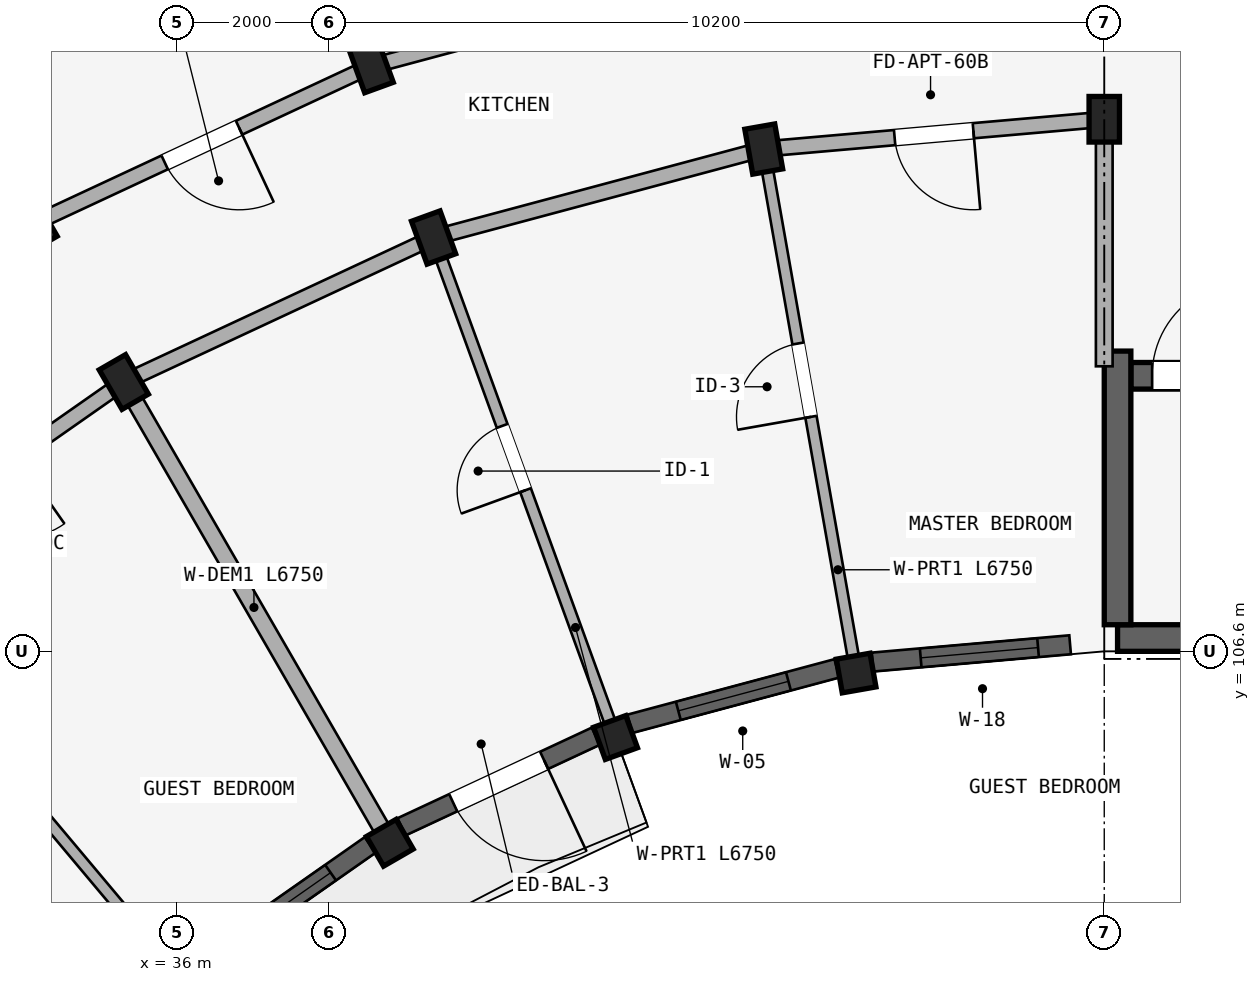
"""IFC4 building model, lengths in metres.
Left out: names, types, materials, properties, quantities, classifications, styles, units other than length and angle.
Written with IfcOpenShell. Run it as: python <this file> out.ifc"""

import sys

from ifc_helpers import new_model, si_unit, direction, frame, frame_2d, origin, origin_2d, place, context, subcontext, project, spatial, rectangle, extrude, element, fill, save


model = new_model("IFC4")
c1 = context("Model", 3, precision=1e-05, world=origin(), true_north=direction((0.0, 1.0)))
c2 = subcontext(c1, "Body", "Model", "MODEL_VIEW")
j1 = project(units=[si_unit("LENGTHUNIT", "METRE"), si_unit("PLANEANGLEUNIT", "RADIAN")], contexts=[c1])
p1 = place(None, origin())
s1 = spatial("IfcSite", under=j1, at=p1, CompositionType="ELEMENT")
p2 = place(p1, origin())
s2 = spatial("IfcBuilding", under=s1, at=p2, CompositionType="ELEMENT")
p3 = place(p2, frame((0.0, 0.0, 49.65)))
s3 = spatial("IfcBuildingStorey", under=s2, at=p3, CompositionType="ELEMENT", Elevation=49.65)
p4 = place(p3, frame((48.375, 106.775, 0.0), z_axis=(0.0, 0.0, 1.0), x_axis=(1.0, 0.0, 0.0)))
e1 = element("IfcWall", 1, at=p4, inside=s3, PredefinedType="SHEAR", context=c2, shape_type="SweptSolid", body=[
    extrude(rectangle(XDim=8.25, YDim=0.35, at=frame_2d((4.125, 0.0))), origin(), (0.0, 0.0, 1.0), 2.91),
])
p5 = place(p3, frame((48.55, 110.225, 0.0), z_axis=(0.0, 0.0, 1.0), x_axis=(1.0, 0.0, 0.0)))
e2 = element("IfcWall", 2, at=p5, inside=s3, PredefinedType="SHEAR", context=c2, shape_type="SweptSolid", body=[
    extrude(rectangle(XDim=7.9, YDim=0.35, at=frame_2d((3.95, 0.0))), origin(), (0.0, 0.0, 1.0), 2.91),
])
p6 = place(p5, frame((0.28, 0.0, 0.0)))
e3 = element("IfcOpeningElement", 3, at=p6, cuts=e2, PredefinedType="OPENING", context=c2, shape_type="SweptSolid", body=[
    extrude(rectangle(XDim=1.24, YDim=2.15, at=frame_2d((0.62, 1.075))), frame((0.0, 0.185, 0.0), z_axis=(0.0, -1.0, 0.0), x_axis=(1.0, 0.0, 0.0)), (0.0, 0.0, 1.0), 0.37),
])
p7 = place(p3, frame((48.375, 106.95, 0.0), z_axis=(0.0, 0.0, 1.0), x_axis=(0.0, 1.0, 0.0)))
e4 = element("IfcWall", 4, at=p7, inside=s3, PredefinedType="SHEAR", context=c2, shape_type="SweptSolid", body=[
    extrude(rectangle(XDim=3.6, YDim=0.35, at=frame_2d((1.8, 0.0))), origin(), (0.0, 0.0, 1.0), 2.91),
])
p8 = place(p3, frame((48.2, 113.6, 0.0), z_axis=(0.0, 0.0, 1.0), x_axis=(1.0, 0.0, 0.0)))
e5 = element("IfcColumn", 5, at=p8, inside=s3, PredefinedType="COLUMN", context=c2, shape_type="SweptSolid", body=[
    extrude(rectangle(XDim=0.4, YDim=0.6, at=origin_2d()), origin(), (0.0, 0.0, 1.0), 2.91),
])
p9 = place(p3, frame((44.935, 106.314, 0.0), z_axis=(0.0, 0.0, 1.0), x_axis=(0.984807753012, 0.173648177667, 0.0)))
e6 = element("IfcColumn", 6, at=p9, inside=s3, PredefinedType="COLUMN", context=c2, shape_type="SweptSolid", body=[
    extrude(rectangle(XDim=0.45, YDim=0.45, at=origin_2d()), origin(), (0.0, 0.0, 1.0), 2.91),
])
p10 = place(p3, frame((43.72, 113.208, 0.0), z_axis=(0.0, 0.0, 1.0), x_axis=(0.984807753012, 0.173648177667, 0.0)))
e7 = element("IfcColumn", 7, at=p10, inside=s3, PredefinedType="COLUMN", context=c2, shape_type="SweptSolid", body=[
    extrude(rectangle(XDim=0.4, YDim=0.6, at=origin_2d()), origin(), (0.0, 0.0, 1.0), 2.91),
])
p11 = place(p3, frame((41.77, 105.466, 0.0), z_axis=(0.0, 0.0, 1.0), x_axis=(0.939692620786, 0.342020143326, 0.0)))
e8 = element("IfcColumn", 8, at=p11, inside=s3, PredefinedType="COLUMN", context=c2, shape_type="SweptSolid", body=[
    extrude(rectangle(XDim=0.45, YDim=0.45, at=origin_2d()), origin(), (0.0, 0.0, 1.0), 2.91),
])
for number, where, z_axis, x_axis in (
    (9, (39.376, 112.044, 0.0), (0.0, 0.0, 1.0), (0.94, 0.342, 0.0)),
    (10, (38.555, 114.299, 0.0), (0.0, 0.0, 1.0), (0.94, 0.342, 0.0)),
):
    element("IfcColumn", number, at=place(p3, frame(where, z_axis=z_axis, x_axis=x_axis)), inside=s3, PredefinedType="COLUMN", context=c2, shape_type="SweptSolid", body=[
        extrude(rectangle(XDim=0.4, YDim=0.6, at=origin_2d()), origin(), (0.0, 0.0, 1.0), 2.91),
    ])
p12 = place(p3, frame((38.8, 104.081, 0.0), z_axis=(0.0, 0.0, 1.0), x_axis=(0.866025403784, 0.5, 0.0)))
e11 = element("IfcColumn", 11, at=p12, inside=s3, PredefinedType="COLUMN", context=c2, shape_type="SweptSolid", body=[
    extrude(rectangle(XDim=0.45, YDim=0.45, at=origin_2d()), origin(), (0.0, 0.0, 1.0), 2.91),
])
for number, where, z_axis, x_axis in (
    (12, (35.3, 110.144, 0.0), (0.0, 0.0, 1.0), (0.866, 0.5, 0.0)),
    (13, (34.1, 112.222, 0.0), (0.0, 0.0, 1.0), (0.866, 0.5, 0.0)),
):
    element("IfcColumn", number, at=place(p3, frame(where, z_axis=z_axis, x_axis=x_axis)), inside=s3, PredefinedType="COLUMN", context=c2, shape_type="SweptSolid", body=[
        extrude(rectangle(XDim=0.4, YDim=0.6, at=origin_2d()), origin(), (0.0, 0.0, 1.0), 2.91),
    ])
p13 = place(p3, frame((48.2, 113.6, 0.0), z_axis=(0.0, 0.0, 1.0), x_axis=(-0.996191949488, -0.087187153726, 0.0)))
e14 = element("IfcWall", 14, at=p13, inside=s3, PredefinedType="STANDARD", context=c2, shape_type="SweptSolid", body=[
    extrude(rectangle(XDim=4.497, YDim=0.2, at=frame_2d((2.249, 0.0))), origin(), (0.0, 0.0, 1.0), 2.352),
])
p14 = place(p13, frame((1.729, 0.0, 0.0)))
e15 = element("IfcOpeningElement", 15, at=p14, cuts=e14, PredefinedType="OPENING", context=c2, shape_type="SweptSolid", body=[
    extrude(rectangle(XDim=1.04, YDim=2.15, at=frame_2d((0.52, 1.075))), frame((0.0, 0.11, 0.0), z_axis=(0.0, -1.0, 0.0), x_axis=(1.0, 0.0, 0.0)), (0.0, 0.0, 1.0), 0.22),
])
p15 = place(p3, frame((43.72, 113.208, 0.0), z_axis=(0.0, 0.0, 1.0), x_axis=(-0.965934240054, -0.258787642463, 0.0)))
e16 = element("IfcWall", 16, at=p15, inside=s3, PredefinedType="STANDARD", context=c2, shape_type="SweptSolid", body=[
    extrude(rectangle(XDim=4.497, YDim=0.2, at=frame_2d((2.249, 0.0))), origin(), (0.0, 0.0, 1.0), 2.352),
])
p16 = place(p3, frame((43.303, 115.572, 0.0), z_axis=(0.0, 0.0, 1.0), x_axis=(-0.965930095386, -0.258803112091, 0.0)))
e17 = element("IfcWall", 17, at=p16, inside=s3, PredefinedType="STANDARD", context=c2, shape_type="SweptSolid", body=[
    extrude(rectangle(XDim=4.916, YDim=0.2, at=frame_2d((2.458, 0.0))), origin(), (0.0, 0.0, 1.0), 2.352),
])
p17 = place(p3, frame((39.376, 112.044, 0.0), z_axis=(0.0, 0.0, 1.0), x_axis=(-0.906307919131, -0.422617978463, 0.0)))
e18 = element("IfcWall", 18, at=p17, inside=s3, PredefinedType="STANDARD", context=c2, shape_type="SweptSolid", body=[
    extrude(rectangle(XDim=4.497, YDim=0.2, at=frame_2d((2.249, 0.0))), origin(), (0.0, 0.0, 1.0), 2.352),
])
p18 = place(p3, frame((38.555, 114.299, 0.0), z_axis=(0.0, 0.0, 1.0), x_axis=(-0.906302381024, -0.422629854778, 0.0)))
e19 = element("IfcWall", 19, at=p18, inside=s3, PredefinedType="STANDARD", context=c2, shape_type="SweptSolid", body=[
    extrude(rectangle(XDim=4.915, YDim=0.2, at=frame_2d((2.458, 0.0))), origin(), (0.0, 0.0, 1.0), 2.352),
])
p19 = place(p18, frame((1.918, 0.0, 0.0)))
e20 = element("IfcOpeningElement", 20, at=p19, cuts=e19, PredefinedType="OPENING", context=c2, shape_type="SweptSolid", body=[
    extrude(rectangle(XDim=1.08, YDim=2.15, at=frame_2d((0.54, 1.075))), frame((0.0, 0.11, 0.0), z_axis=(0.0, -1.0, 0.0), x_axis=(1.0, 0.0, 0.0)), (0.0, 0.0, 1.0), 0.22),
])
p20 = place(p3, frame((35.3, 110.144, 0.0), z_axis=(0.0, 0.0, 1.0), x_axis=(-0.819155404658, -0.573571637217, 0.0)))
e21 = element("IfcWall", 21, at=p20, inside=s3, PredefinedType="STANDARD", context=c2, shape_type="SweptSolid", body=[
    extrude(rectangle(XDim=4.497, YDim=0.2, at=frame_2d((2.249, 0.0))), origin(), (0.0, 0.0, 1.0), 2.352),
])
p21 = place(p20, frame((1.709, 0.0, 0.0)))
e22 = element("IfcOpeningElement", 22, at=p21, cuts=e21, PredefinedType="OPENING", context=c2, shape_type="SweptSolid", body=[
    extrude(rectangle(XDim=1.08, YDim=2.15, at=frame_2d((0.54, 1.075))), frame((0.0, 0.11, 0.0), z_axis=(0.0, -1.0, 0.0), x_axis=(1.0, 0.0, 0.0)), (0.0, 0.0, 1.0), 0.22),
])
p22 = place(p3, frame((48.2, 110.35, 0.0), z_axis=(0.0, 0.0, 1.0), x_axis=(0.0, 1.0, 0.0)))
e23 = element("IfcWall", 23, at=p22, inside=s3, PredefinedType="STANDARD", context=c2, shape_type="SweptSolid", body=[
    extrude(rectangle(XDim=3.2, YDim=0.22, at=frame_2d((1.6, 0.0))), origin(), (0.0, 0.0, 1.0), 2.352),
])
p23 = place(p3, frame((44.901, 106.511, 0.0), z_axis=(0.0, 0.0, 1.0), x_axis=(-0.173647089161, 0.984807944945, 0.0)))
e24 = element("IfcWall", 24, at=p23, inside=s3, PredefinedType="PARTITIONING", context=c2, shape_type="SweptSolid", body=[
    extrude(rectangle(XDim=6.75, YDim=0.15, at=frame_2d((3.375, 0.0))), origin(), (0.0, 0.0, 1.0), 2.352),
])
p24 = place(p23, frame((3.222, 0.0, 0.0)))
e25 = element("IfcOpeningElement", 25, at=p24, cuts=e24, PredefinedType="OPENING", context=c2, shape_type="SweptSolid", body=[
    extrude(rectangle(XDim=0.98, YDim=2.12, at=frame_2d((0.49, 1.06))), frame((0.0, 0.085, 0.0), z_axis=(0.0, -1.0, 0.0), x_axis=(1.0, 0.0, 0.0)), (0.0, 0.0, 1.0), 0.17),
])
p25 = place(p3, frame((41.702, 105.654, 0.0), z_axis=(0.0, 0.0, 1.0), x_axis=(-0.342010221662, 0.939696231917, 0.0)))
e26 = element("IfcWall", 26, at=p25, inside=s3, PredefinedType="PARTITIONING", context=c2, shape_type="SweptSolid", body=[
    extrude(rectangle(XDim=6.75, YDim=0.15, at=frame_2d((3.375, 0.0))), origin(), (0.0, 0.0, 1.0), 2.352),
])
p26 = place(p25, frame((3.262, 0.0, 0.0)))
e27 = element("IfcOpeningElement", 27, at=p26, cuts=e26, PredefinedType="OPENING", context=c2, shape_type="SweptSolid", body=[
    extrude(rectangle(XDim=0.9, YDim=2.1, at=frame_2d((0.45, 1.05))), frame((0.0, 0.085, 0.0), z_axis=(0.0, -1.0, 0.0), x_axis=(1.0, 0.0, 0.0)), (0.0, 0.0, 1.0), 0.17),
])
p27 = place(p3, frame((38.521, 114.393, 0.0), z_axis=(0.0, 0.0, 1.0), x_axis=(-0.341992021352, 0.939702855871, 0.0)))
e28 = element("IfcWall", 28, at=p27, inside=s3, PredefinedType="STANDARD", context=c2, shape_type="SweptSolid", body=[
    extrude(rectangle(XDim=6.22, YDim=0.22, at=frame_2d((3.11, 0.0))), origin(), (0.0, 0.0, 1.0), 2.352),
])
p28 = place(p3, frame((38.7, 104.254, 0.0), z_axis=(0.0, 0.0, 1.0), x_axis=(-0.499997969693, 0.866026575979, 0.0)))
e29 = element("IfcWall", 29, at=p28, inside=s3, PredefinedType="STANDARD", context=c2, shape_type="SweptSolid", body=[
    extrude(rectangle(XDim=6.75, YDim=0.22, at=frame_2d((3.375, 0.0))), origin(), (0.0, 0.0, 1.0), 2.352),
])
p29 = place(p3, frame((35.987, 102.355, 0.0), z_axis=(0.0, 0.0, 1.0), x_axis=(-0.642784846501, 0.766046761698, 0.0)))
e30 = element("IfcWall", 30, at=p29, inside=s3, PredefinedType="PARTITIONING", context=c2, shape_type="SweptSolid", body=[
    extrude(rectangle(XDim=6.75, YDim=0.15, at=frame_2d((3.375, 0.0))), origin(), (0.0, 0.0, 1.0), 2.352),
])
p30 = place(p29, frame((3.222, 0.0, 0.0)))
e31 = element("IfcOpeningElement", 31, at=p30, cuts=e30, PredefinedType="OPENING", context=c2, shape_type="SweptSolid", body=[
    extrude(rectangle(XDim=0.98, YDim=2.12, at=frame_2d((0.49, 1.06))), frame((0.0, 0.085, 0.0), z_axis=(0.0, -1.0, 0.0), x_axis=(1.0, 0.0, 0.0)), (0.0, 0.0, 1.0), 0.17),
])
p31 = place(p3, frame((47.751, 106.686, 0.0), z_axis=(0.0, 0.0, 1.0), x_axis=(-0.996188433092, -0.087227322402, 0.0)))
e32 = element("IfcWall", 32, at=p31, inside=s3, PredefinedType="STANDARD", context=c2, shape_type="SweptSolid", body=[
    extrude(rectangle(XDim=2.609, YDim=0.25, at=frame_2d((1.304, 0.0))), origin(), (0.0, 0.0, 1.0), 2.402),
])
p32 = place(p31, frame((0.424, 0.0, 0.602)))
e33 = element("IfcOpeningElement", 33, at=p32, cuts=e32, PredefinedType="OPENING", context=c2, shape_type="SweptSolid", body=[
    extrude(rectangle(XDim=1.55, YDim=1.6, at=frame_2d((0.775, 0.8))), frame((0.0, 0.135, 0.0), z_axis=(0.0, -1.0, 0.0), x_axis=(1.0, 0.0, 0.0)), (0.0, 0.0, 1.0), 0.27),
])
p33 = place(p3, frame((44.682, 106.376, 0.0), z_axis=(0.0, 0.0, 1.0), x_axis=(-0.965921001908, -0.258837049266, 0.0)))
e34 = element("IfcWall", 34, at=p33, inside=s3, PredefinedType="STANDARD", context=c2, shape_type="SweptSolid", body=[
    extrude(rectangle(XDim=2.82, YDim=0.25, at=frame_2d((1.41, 0.0))), origin(), (0.0, 0.0, 1.0), 2.402),
])
p34 = place(p33, frame((0.66, 0.0, 0.552)))
e35 = element("IfcOpeningElement", 35, at=p34, cuts=e34, PredefinedType="OPENING", context=c2, shape_type="SweptSolid", body=[
    extrude(rectangle(XDim=1.5, YDim=1.65, at=frame_2d((0.75, 0.825))), frame((0.0, 0.135, 0.0), z_axis=(0.0, -1.0, 0.0), x_axis=(1.0, 0.0, 0.0)), (0.0, 0.0, 1.0), 0.27),
])
p35 = place(p3, frame((41.51, 105.483, 0.0), z_axis=(0.0, 0.0, 1.0), x_axis=(-0.906284857185, -0.422667431484, 0.0)))
e36 = element("IfcWall", 36, at=p35, inside=s3, PredefinedType="STANDARD", context=c2, shape_type="SweptSolid", body=[
    extrude(rectangle(XDim=2.82, YDim=0.25, at=frame_2d((1.41, 0.0))), origin(), (0.0, 0.0, 1.0), 2.402),
])
p36 = place(p35, frame((0.75, 0.0, 0.0)))
e37 = element("IfcOpeningElement", 37, at=p36, cuts=e36, PredefinedType="OPENING", context=c2, shape_type="SweptSolid", body=[
    extrude(rectangle(XDim=1.32, YDim=2.15, at=frame_2d((0.66, 1.075))), frame((0.0, 0.135, 0.0), z_axis=(0.0, -1.0, 0.0), x_axis=(1.0, 0.0, 0.0)), (0.0, 0.0, 1.0), 0.27),
])
p37 = place(p3, frame((38.541, 104.053, 0.0), z_axis=(0.0, 0.0, 1.0), x_axis=(-0.819154644592, -0.573572722716, 0.0)))
e38 = element("IfcWall", 38, at=p37, inside=s3, PredefinedType="STANDARD", context=c2, shape_type="SweptSolid", body=[
    extrude(rectangle(XDim=2.82, YDim=0.25, at=frame_2d((1.41, 0.0))), origin(), (0.0, 0.0, 1.0), 2.402),
])
p38 = place(p37, frame((0.635, 0.0, 0.602)))
e39 = element("IfcOpeningElement", 39, at=p38, cuts=e38, PredefinedType="OPENING", context=c2, shape_type="SweptSolid", body=[
    extrude(rectangle(XDim=1.55, YDim=1.6, at=frame_2d((0.775, 0.8))), frame((0.0, 0.135, 0.0), z_axis=(0.0, -1.0, 0.0), x_axis=(1.0, 0.0, 0.0)), (0.0, 0.0, 1.0), 0.27),
])
p39 = place(p32, origin())
e40 = element("IfcWindow", 40, at=p39, inside=s3, PartitioningType="DOUBLE_PANEL_VERTICAL", PredefinedType="WINDOW", context=c2, shape_type="SweptSolid", body=[
    extrude(rectangle(XDim=1.55, YDim=1.6, at=frame_2d((0.775, 0.8))), frame((0.0, 0.03, 0.0), z_axis=(0.0, -1.0, 0.0), x_axis=(1.0, 0.0, 0.0)), (0.0, 0.0, 1.0), 0.06),
])
fill(e33, e40)
p40 = place(p34, origin())
e41 = element("IfcWindow", 41, at=p40, inside=s3, PartitioningType="DOUBLE_PANEL_VERTICAL", PredefinedType="WINDOW", context=c2, shape_type="SweptSolid", body=[
    extrude(rectangle(XDim=1.5, YDim=1.65, at=frame_2d((0.75, 0.825))), frame((0.0, 0.03, 0.0), z_axis=(0.0, -1.0, 0.0), x_axis=(1.0, 0.0, 0.0)), (0.0, 0.0, 1.0), 0.06),
])
fill(e35, e41)
p41 = place(p38, origin())
e42 = element("IfcWindow", 42, at=p41, inside=s3, PartitioningType="DOUBLE_PANEL_VERTICAL", PredefinedType="WINDOW", context=c2, shape_type="SweptSolid", body=[
    extrude(rectangle(XDim=1.55, YDim=1.6, at=frame_2d((0.775, 0.8))), frame((0.0, 0.03, 0.0), z_axis=(0.0, -1.0, 0.0), x_axis=(1.0, 0.0, 0.0)), (0.0, 0.0, 1.0), 0.06),
])
fill(e39, e42)
p42 = place(p6, frame((1.24, 0.0, 0.0), z_axis=(0.0, 0.0, 1.0), x_axis=(-1.0, 0.0, 0.0)))
e43 = element("IfcDoor", 43, at=p42, inside=s3, OperationType="SINGLE_SWING_LEFT", PredefinedType="DOOR", context=c2, shape_type="SweptSolid", body=[
    extrude(rectangle(XDim=1.24, YDim=2.15, at=frame_2d((0.62, 1.075))), frame((0.0, 0.025, 0.0), z_axis=(0.0, -1.0, 0.0), x_axis=(1.0, 0.0, 0.0)), (0.0, 0.0, 1.0), 0.05),
])
fill(e3, e43)
p43 = place(p24, frame((0.98, 0.0, 0.0), z_axis=(0.0, 0.0, 1.0), x_axis=(-1.0, 0.0, 0.0)))
e44 = element("IfcDoor", 44, at=p43, inside=s3, OperationType="SINGLE_SWING_RIGHT", PredefinedType="DOOR", context=c2, shape_type="SweptSolid", body=[
    extrude(rectangle(XDim=0.98, YDim=2.12, at=frame_2d((0.49, 1.06))), frame((0.0, 0.025, 0.0), z_axis=(0.0, -1.0, 0.0), x_axis=(1.0, 0.0, 0.0)), (0.0, 0.0, 1.0), 0.05),
])
fill(e25, e44)
p44 = place(p26, frame((0.9, 0.0, 0.0), z_axis=(0.0, 0.0, 1.0), x_axis=(-1.0, 0.0, 0.0)))
e45 = element("IfcDoor", 45, at=p44, inside=s3, OperationType="SINGLE_SWING_RIGHT", PredefinedType="DOOR", context=c2, shape_type="SweptSolid", body=[
    extrude(rectangle(XDim=0.9, YDim=2.1, at=frame_2d((0.45, 1.05))), frame((0.0, 0.025, 0.0), z_axis=(0.0, -1.0, 0.0), x_axis=(1.0, 0.0, 0.0)), (0.0, 0.0, 1.0), 0.05),
])
fill(e27, e45)
p45 = place(p19, frame((1.08, 0.0, 0.0), z_axis=(0.0, 0.0, 1.0), x_axis=(-1.0, 0.0, 0.0)))
e46 = element("IfcDoor", 46, at=p45, inside=s3, OperationType="SINGLE_SWING_RIGHT", PredefinedType="DOOR", context=c2, shape_type="SweptSolid", body=[
    extrude(rectangle(XDim=1.08, YDim=2.15, at=frame_2d((0.54, 1.075))), frame((0.0, 0.025, 0.0), z_axis=(0.0, -1.0, 0.0), x_axis=(1.0, 0.0, 0.0)), (0.0, 0.0, 1.0), 0.05),
])
fill(e20, e46)
p46 = place(p14, origin())
e47 = element("IfcDoor", 47, at=p46, inside=s3, OperationType="SINGLE_SWING_LEFT", PredefinedType="DOOR", context=c2, shape_type="SweptSolid", body=[
    extrude(rectangle(XDim=1.04, YDim=2.15, at=frame_2d((0.52, 1.075))), frame((0.0, 0.025, 0.0), z_axis=(0.0, -1.0, 0.0), x_axis=(1.0, 0.0, 0.0)), (0.0, 0.0, 1.0), 0.05),
])
fill(e15, e47)
p47 = place(p36, origin())
e48 = element("IfcDoor", 48, at=p47, inside=s3, OperationType="SINGLE_SWING_LEFT", PredefinedType="DOOR", context=c2, shape_type="SweptSolid", body=[
    extrude(rectangle(XDim=1.32, YDim=2.15, at=frame_2d((0.66, 1.075))), frame((0.0, 0.025, 0.0), z_axis=(0.0, -1.0, 0.0), x_axis=(1.0, 0.0, 0.0)), (0.0, 0.0, 1.0), 0.05),
])
fill(e37, e48)
save(model, sys.argv[1])
